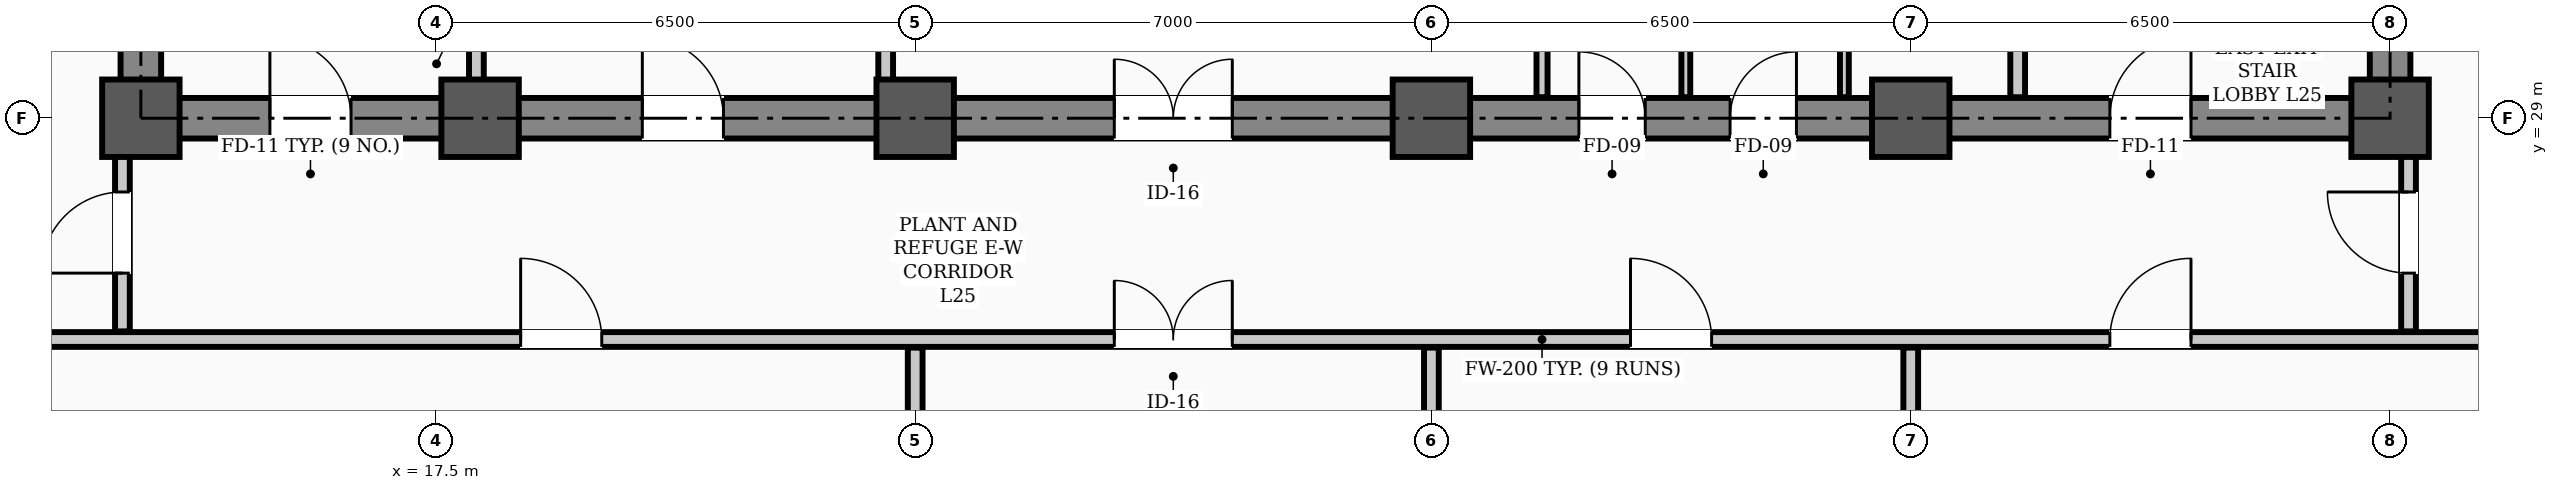
"""IFC4 building model, lengths in metres.
Left out: names, types, materials, properties, quantities, classifications, styles, units other than length and angle.
Written with IfcOpenShell. Run it as: python <this file> out.ifc"""

import sys

from ifc_helpers import new_model, si_unit, direction, frame, frame_2d, origin, origin_2d, place, context, subcontext, project, spatial, rectangle, hollow_rectangle, extrude, element, fill, save


model = new_model("IFC4")
c1 = context("Model", 3, precision=1e-05, world=origin(), true_north=direction((0.0, 1.0)))
c2 = subcontext(c1, "Body", "Model", "MODEL_VIEW")
j1 = project(units=[si_unit("LENGTHUNIT", "METRE"), si_unit("PLANEANGLEUNIT", "RADIAN")], contexts=[c1])
p1 = place(None, origin())
s1 = spatial("IfcSite", under=j1, at=p1, CompositionType="ELEMENT")
p2 = place(p1, origin())
s2 = spatial("IfcBuilding", under=s1, at=p2, CompositionType="ELEMENT")
p3 = place(p2, frame((0.0, 0.0, 100.6)))
s3 = spatial("IfcBuildingStorey", under=s2, at=p3, CompositionType="ELEMENT", Elevation=100.6)
for number, where, z_axis, x_axis in (
    (1, (13.5, 29.0, 0.0), (0.0, 0.0, 1.0), (1.0, 0.0, 0.0)),
    (2, (18.1, 29.0, 0.0), (0.0, 0.0, 1.0), (1.0, 0.0, 0.0)),
    (3, (24.0, 29.0, 0.0), (0.0, 0.0, 1.0), (1.0, 0.0, 0.0)),
    (4, (31.0, 29.0, 0.0), (0.0, 0.0, 1.0), (1.0, 0.0, 0.0)),
    (5, (37.5, 29.0, 0.0), (0.0, 0.0, 1.0), (1.0, 0.0, 0.0)),
    (6, (44.0, 29.0, 0.0), (0.0, 0.0, 1.0), (1.0, 0.0, 0.0)),
):
    element("IfcColumn", number, at=place(p3, frame(where, z_axis=z_axis, x_axis=x_axis)), inside=s3, PredefinedType="COLUMN", context=c2, shape_type="SweptSolid", body=[
        extrude(hollow_rectangle(XDim=1.05, YDim=1.05, WallThickness=0.038, InnerFilletRadius=0.019, OuterFilletRadius=0.057, at=origin_2d()), origin(), (0.0, 0.0, 1.0), 5.4),
    ])
p4 = place(p3, frame((13.5, 29.0, 0.0), z_axis=(0.0, 0.0, 1.0), x_axis=(1.0, 0.0, 0.0)))
e7 = element("IfcWall", 7, at=p4, inside=s3, PredefinedType="SHEAR", context=c2, shape_type="SweptSolid", body=[
    extrude(rectangle(XDim=30.5, YDim=0.55, at=frame_2d((15.25, 0.0))), origin(), (0.0, 0.0, 1.0), 5.22),
])
p5 = place(p4, frame((1.75, 0.0, 0.0)))
e8 = element("IfcOpeningElement", 8, at=p5, cuts=e7, PredefinedType="OPENING", context=c2, shape_type="SweptSolid", body=[
    extrude(rectangle(XDim=1.1, YDim=2.08, at=frame_2d((0.55, 1.04))), frame((0.0, 0.285, 0.0), z_axis=(0.0, -1.0, 0.0), x_axis=(1.0, 0.0, 0.0)), (0.0, 0.0, 1.0), 0.57),
])
p6 = place(p4, frame((26.7, 0.0, 0.0)))
e9 = element("IfcOpeningElement", 9, at=p6, cuts=e7, PredefinedType="OPENING", context=c2, shape_type="SweptSolid", body=[
    extrude(rectangle(XDim=1.1, YDim=2.08, at=frame_2d((0.55, 1.04))), frame((0.0, 0.285, 0.0), z_axis=(0.0, -1.0, 0.0), x_axis=(1.0, 0.0, 0.0)), (0.0, 0.0, 1.0), 0.57),
])
p7 = place(p4, frame((6.8, 0.0, 0.0)))
e10 = element("IfcOpeningElement", 10, at=p7, cuts=e7, PredefinedType="OPENING", context=c2, shape_type="SweptSolid", body=[
    extrude(rectangle(XDim=1.1, YDim=2.08, at=frame_2d((0.55, 1.04))), frame((0.0, 0.285, 0.0), z_axis=(0.0, -1.0, 0.0), x_axis=(1.0, 0.0, 0.0)), (0.0, 0.0, 1.0), 0.57),
])
p8 = place(p4, frame((13.2, 0.0, 0.0)))
e11 = element("IfcOpeningElement", 11, at=p8, cuts=e7, PredefinedType="OPENING", context=c2, shape_type="SweptSolid", body=[
    extrude(rectangle(XDim=1.6, YDim=2.08, at=frame_2d((0.8, 1.04))), frame((0.0, 0.285, 0.0), z_axis=(0.0, -1.0, 0.0), x_axis=(1.0, 0.0, 0.0)), (0.0, 0.0, 1.0), 0.57),
])
p9 = place(p4, frame((19.5, 0.0, 0.0)))
e12 = element("IfcOpeningElement", 12, at=p9, cuts=e7, PredefinedType="OPENING", context=c2, shape_type="SweptSolid", body=[
    extrude(rectangle(XDim=0.9, YDim=2.08, at=frame_2d((0.45, 1.04))), frame((0.0, 0.285, 0.0), z_axis=(0.0, -1.0, 0.0), x_axis=(1.0, 0.0, 0.0)), (0.0, 0.0, 1.0), 0.57),
])
p10 = place(p4, frame((21.55, 0.0, 0.0)))
e13 = element("IfcOpeningElement", 13, at=p10, cuts=e7, PredefinedType="OPENING", context=c2, shape_type="SweptSolid", body=[
    extrude(rectangle(XDim=0.9, YDim=2.08, at=frame_2d((0.45, 1.04))), frame((0.0, 0.285, 0.0), z_axis=(0.0, -1.0, 0.0), x_axis=(1.0, 0.0, 0.0)), (0.0, 0.0, 1.0), 0.57),
])
for number, where, z_axis, x_axis in (
    (14, (13.5, 29.35, 0.0), (0.0, 0.0, 1.0), (0.0, 1.0, 0.0)),
    (15, (44.0, 29.35, 0.0), (0.0, 0.0, 1.0), (0.0, 1.0, 0.0)),
):
    element("IfcWall", number, at=place(p3, frame(where, z_axis=z_axis, x_axis=x_axis)), inside=s3, PredefinedType="SHEAR", context=c2, shape_type="SweptSolid", body=[
        extrude(rectangle(XDim=8.6, YDim=0.55, at=frame_2d((4.3, 0.0))), origin(), (0.0, 0.0, 1.0), 5.22),
    ])
p11 = place(p3, frame((7.81, 26.0, 0.0), z_axis=(0.0, 0.0, 1.0), x_axis=(1.0, 0.0, 0.0)))
e16 = element("IfcWall", 16, at=p11, inside=s3, PredefinedType="STANDARD", context=c2, shape_type="SweptSolid", body=[
    extrude(rectangle(XDim=49.38, YDim=0.2, at=frame_2d((24.69, 0.0))), origin(), (0.0, 0.0, 1.0), 4.6),
])
p12 = place(p11, frame((10.84, 0.0, 0.0)))
e17 = element("IfcOpeningElement", 17, at=p12, cuts=e16, PredefinedType="OPENING", context=c2, shape_type="SweptSolid", body=[
    extrude(rectangle(XDim=1.1, YDim=2.08, at=frame_2d((0.55, 1.04))), frame((0.0, 0.11, 0.0), z_axis=(0.0, -1.0, 0.0), x_axis=(1.0, 0.0, 0.0)), (0.0, 0.0, 1.0), 0.22),
])
p13 = place(p11, frame((18.89, 0.0, 0.0)))
e18 = element("IfcOpeningElement", 18, at=p13, cuts=e16, PredefinedType="OPENING", context=c2, shape_type="SweptSolid", body=[
    extrude(rectangle(XDim=1.6, YDim=2.08, at=frame_2d((0.8, 1.04))), frame((0.0, 0.11, 0.0), z_axis=(0.0, -1.0, 0.0), x_axis=(1.0, 0.0, 0.0)), (0.0, 0.0, 1.0), 0.22),
])
p14 = place(p11, frame((25.89, 0.0, 0.0)))
e19 = element("IfcOpeningElement", 19, at=p14, cuts=e16, PredefinedType="OPENING", context=c2, shape_type="SweptSolid", body=[
    extrude(rectangle(XDim=1.1, YDim=2.08, at=frame_2d((0.55, 1.04))), frame((0.0, 0.11, 0.0), z_axis=(0.0, -1.0, 0.0), x_axis=(1.0, 0.0, 0.0)), (0.0, 0.0, 1.0), 0.22),
])
p15 = place(p11, frame((32.39, 0.0, 0.0)))
e20 = element("IfcOpeningElement", 20, at=p15, cuts=e16, PredefinedType="OPENING", context=c2, shape_type="SweptSolid", body=[
    extrude(rectangle(XDim=1.1, YDim=2.08, at=frame_2d((0.55, 1.04))), frame((0.0, 0.11, 0.0), z_axis=(0.0, -1.0, 0.0), x_axis=(1.0, 0.0, 0.0)), (0.0, 0.0, 1.0), 0.22),
])
for number, where, z_axis, x_axis in (
    (21, (18.05, 29.285, 0.0), (0.0, 0.0, 1.0), (0.0, 1.0, 0.0)),
    (22, (38.95, 29.285, 0.0), (0.0, 0.0, 1.0), (0.0, 1.0, 0.0)),
):
    element("IfcWall", number, at=place(p3, frame(where, z_axis=z_axis, x_axis=x_axis)), inside=s3, PredefinedType="STANDARD", context=c2, shape_type="SweptSolid", body=[
        extrude(rectangle(XDim=1.015, YDim=0.2, at=frame_2d((0.508, 0.0))), origin(), (0.0, 0.0, 1.0), 4.8),
    ])
p16 = place(p3, frame((23.6, 29.285, 0.0), z_axis=(0.0, 0.0, 1.0), x_axis=(0.0, 1.0, 0.0)))
e23 = element("IfcWall", 23, at=p16, inside=s3, PredefinedType="STANDARD", context=c2, shape_type="SweptSolid", body=[
    extrude(rectangle(XDim=5.415, YDim=0.2, at=frame_2d((2.708, 0.0))), origin(), (0.0, 0.0, 1.0), 4.6),
])
p17 = place(p3, frame((32.5, 29.285, 0.0), z_axis=(0.0, 0.0, 1.0), x_axis=(0.0, 1.0, 0.0)))
e24 = element("IfcWall", 24, at=p17, inside=s3, PredefinedType="PARTITIONING", context=c2, shape_type="SweptSolid", body=[
    extrude(rectangle(XDim=2.48, YDim=0.15, at=frame_2d((1.24, 0.0))), origin(), (0.0, 0.0, 1.0), 4.8),
])
for number, where, z_axis, x_axis in (
    (25, (36.6, 29.285, 0.0), (0.0, 0.0, 1.0), (0.0, 1.0, 0.0)),
    (26, (34.45, 29.285, 0.0), (0.0, 0.0, 1.0), (0.0, 1.0, 0.0)),
):
    element("IfcWall", number, at=place(p3, frame(where, z_axis=z_axis, x_axis=x_axis)), inside=s3, PredefinedType="PARTITIONING", context=c2, shape_type="SweptSolid", body=[
        extrude(rectangle(XDim=2.48, YDim=0.12, at=frame_2d((1.24, 0.0))), origin(), (0.0, 0.0, 1.0), 4.8),
    ])
p18 = place(p3, frame((13.25, 26.11, 0.0), z_axis=(0.0, 0.0, 1.0), x_axis=(0.0, 1.0, 0.0)))
e27 = element("IfcWall", 27, at=p18, inside=s3, PredefinedType="STANDARD", context=c2, shape_type="SweptSolid", body=[
    extrude(rectangle(XDim=3.24, YDim=0.2, at=frame_2d((1.62, 0.0))), origin(), (0.0, 0.0, 1.0), 4.5),
])
p19 = place(p18, frame((0.79, 0.0, 0.0)))
e28 = element("IfcOpeningElement", 28, at=p19, cuts=e27, PredefinedType="OPENING", context=c2, shape_type="SweptSolid", body=[
    extrude(rectangle(XDim=1.1, YDim=2.08, at=frame_2d((0.55, 1.04))), frame((0.0, 0.11, 0.0), z_axis=(0.0, -1.0, 0.0), x_axis=(1.0, 0.0, 0.0)), (0.0, 0.0, 1.0), 0.22),
])
p20 = place(p3, frame((44.25, 26.11, 0.0), z_axis=(0.0, 0.0, 1.0), x_axis=(0.0, 1.0, 0.0)))
e29 = element("IfcWall", 29, at=p20, inside=s3, PredefinedType="STANDARD", context=c2, shape_type="SweptSolid", body=[
    extrude(rectangle(XDim=3.24, YDim=0.2, at=frame_2d((1.62, 0.0))), origin(), (0.0, 0.0, 1.0), 4.5),
])
p21 = place(p20, frame((0.79, 0.0, 0.0)))
e30 = element("IfcOpeningElement", 30, at=p21, cuts=e29, PredefinedType="OPENING", context=c2, shape_type="SweptSolid", body=[
    extrude(rectangle(XDim=1.1, YDim=2.08, at=frame_2d((0.55, 1.04))), frame((0.0, 0.11, 0.0), z_axis=(0.0, -1.0, 0.0), x_axis=(1.0, 0.0, 0.0)), (0.0, 0.0, 1.0), 0.22),
])
for number, where, z_axis, x_axis in (
    (31, (24.0, 9.81, 0.0), (0.0, 0.0, 1.0), (0.0, 1.0, 0.0)),
    (32, (31.0, 9.81, 0.0), (0.0, 0.0, 1.0), (0.0, 1.0, 0.0)),
    (33, (37.5, 9.81, 0.0), (0.0, 0.0, 1.0), (0.0, 1.0, 0.0)),
):
    element("IfcWall", number, at=place(p3, frame(where, z_axis=z_axis, x_axis=x_axis)), inside=s3, PredefinedType="STANDARD", context=c2, shape_type="SweptSolid", body=[
        extrude(rectangle(XDim=16.08, YDim=0.2, at=frame_2d((8.04, 0.0))), origin(), (0.0, 0.0, 1.0), 4.5),
    ])
p22 = place(p5, origin())
e34 = element("IfcDoor", 34, at=p22, inside=s3, OperationType="SINGLE_SWING_LEFT", PredefinedType="DOOR", context=c2, shape_type="SweptSolid", body=[
    extrude(rectangle(XDim=1.1, YDim=2.08, at=frame_2d((0.55, 1.04))), frame((0.0, 0.025, 0.0), z_axis=(0.0, -1.0, 0.0), x_axis=(1.0, 0.0, 0.0)), (0.0, 0.0, 1.0), 0.05),
])
fill(e8, e34)
p23 = place(p6, origin())
e35 = element("IfcDoor", 35, at=p23, inside=s3, OperationType="SINGLE_SWING_RIGHT", PredefinedType="DOOR", context=c2, shape_type="SweptSolid", body=[
    extrude(rectangle(XDim=1.1, YDim=2.08, at=frame_2d((0.55, 1.04))), frame((0.0, 0.025, 0.0), z_axis=(0.0, -1.0, 0.0), x_axis=(1.0, 0.0, 0.0)), (0.0, 0.0, 1.0), 0.05),
])
fill(e9, e35)
p24 = place(p7, origin())
e36 = element("IfcDoor", 36, at=p24, inside=s3, OperationType="SINGLE_SWING_LEFT", PredefinedType="DOOR", context=c2, shape_type="SweptSolid", body=[
    extrude(rectangle(XDim=1.1, YDim=2.08, at=frame_2d((0.55, 1.04))), frame((0.0, 0.025, 0.0), z_axis=(0.0, -1.0, 0.0), x_axis=(1.0, 0.0, 0.0)), (0.0, 0.0, 1.0), 0.05),
])
fill(e10, e36)
p25 = place(p8, origin())
e37 = element("IfcDoor", 37, at=p25, inside=s3, OperationType="DOUBLE_DOOR_SINGLE_SWING", PredefinedType="DOOR", context=c2, shape_type="SweptSolid", body=[
    extrude(rectangle(XDim=1.6, YDim=2.08, at=frame_2d((0.8, 1.04))), frame((0.0, 0.025, 0.0), z_axis=(0.0, -1.0, 0.0), x_axis=(1.0, 0.0, 0.0)), (0.0, 0.0, 1.0), 0.05),
])
fill(e11, e37)
p26 = place(p9, origin())
e38 = element("IfcDoor", 38, at=p26, inside=s3, OperationType="SINGLE_SWING_LEFT", PredefinedType="DOOR", context=c2, shape_type="SweptSolid", body=[
    extrude(rectangle(XDim=0.9, YDim=2.08, at=frame_2d((0.45, 1.04))), frame((0.0, 0.025, 0.0), z_axis=(0.0, -1.0, 0.0), x_axis=(1.0, 0.0, 0.0)), (0.0, 0.0, 1.0), 0.05),
])
fill(e12, e38)
p27 = place(p10, origin())
e39 = element("IfcDoor", 39, at=p27, inside=s3, OperationType="SINGLE_SWING_RIGHT", PredefinedType="DOOR", context=c2, shape_type="SweptSolid", body=[
    extrude(rectangle(XDim=0.9, YDim=2.08, at=frame_2d((0.45, 1.04))), frame((0.0, 0.025, 0.0), z_axis=(0.0, -1.0, 0.0), x_axis=(1.0, 0.0, 0.0)), (0.0, 0.0, 1.0), 0.05),
])
fill(e13, e39)
p28 = place(p19, origin())
e40 = element("IfcDoor", 40, at=p28, inside=s3, OperationType="SINGLE_SWING_LEFT", PredefinedType="DOOR", context=c2, shape_type="SweptSolid", body=[
    extrude(rectangle(XDim=1.1, YDim=2.08, at=frame_2d((0.55, 1.04))), frame((0.0, 0.025, 0.0), z_axis=(0.0, -1.0, 0.0), x_axis=(1.0, 0.0, 0.0)), (0.0, 0.0, 1.0), 0.05),
])
fill(e28, e40)
p29 = place(p21, origin())
e41 = element("IfcDoor", 41, at=p29, inside=s3, OperationType="SINGLE_SWING_RIGHT", PredefinedType="DOOR", context=c2, shape_type="SweptSolid", body=[
    extrude(rectangle(XDim=1.1, YDim=2.08, at=frame_2d((0.55, 1.04))), frame((0.0, 0.025, 0.0), z_axis=(0.0, -1.0, 0.0), x_axis=(1.0, 0.0, 0.0)), (0.0, 0.0, 1.0), 0.05),
])
fill(e30, e41)
p30 = place(p12, origin())
e42 = element("IfcDoor", 42, at=p30, inside=s3, OperationType="SINGLE_SWING_LEFT", PredefinedType="DOOR", context=c2, shape_type="SweptSolid", body=[
    extrude(rectangle(XDim=1.1, YDim=2.08, at=frame_2d((0.55, 1.04))), frame((0.0, 0.025, 0.0), z_axis=(0.0, -1.0, 0.0), x_axis=(1.0, 0.0, 0.0)), (0.0, 0.0, 1.0), 0.05),
])
fill(e17, e42)
p31 = place(p13, origin())
e43 = element("IfcDoor", 43, at=p31, inside=s3, OperationType="DOUBLE_DOOR_SINGLE_SWING", PredefinedType="DOOR", context=c2, shape_type="SweptSolid", body=[
    extrude(rectangle(XDim=1.6, YDim=2.08, at=frame_2d((0.8, 1.04))), frame((0.0, 0.025, 0.0), z_axis=(0.0, -1.0, 0.0), x_axis=(1.0, 0.0, 0.0)), (0.0, 0.0, 1.0), 0.05),
])
fill(e18, e43)
p32 = place(p14, origin())
e44 = element("IfcDoor", 44, at=p32, inside=s3, OperationType="SINGLE_SWING_LEFT", PredefinedType="DOOR", context=c2, shape_type="SweptSolid", body=[
    extrude(rectangle(XDim=1.1, YDim=2.08, at=frame_2d((0.55, 1.04))), frame((0.0, 0.025, 0.0), z_axis=(0.0, -1.0, 0.0), x_axis=(1.0, 0.0, 0.0)), (0.0, 0.0, 1.0), 0.05),
])
fill(e19, e44)
p33 = place(p15, origin())
e45 = element("IfcDoor", 45, at=p33, inside=s3, OperationType="SINGLE_SWING_RIGHT", PredefinedType="DOOR", context=c2, shape_type="SweptSolid", body=[
    extrude(rectangle(XDim=1.1, YDim=2.08, at=frame_2d((0.55, 1.04))), frame((0.0, 0.025, 0.0), z_axis=(0.0, -1.0, 0.0), x_axis=(1.0, 0.0, 0.0)), (0.0, 0.0, 1.0), 0.05),
])
fill(e20, e45)
save(model, sys.argv[1])
